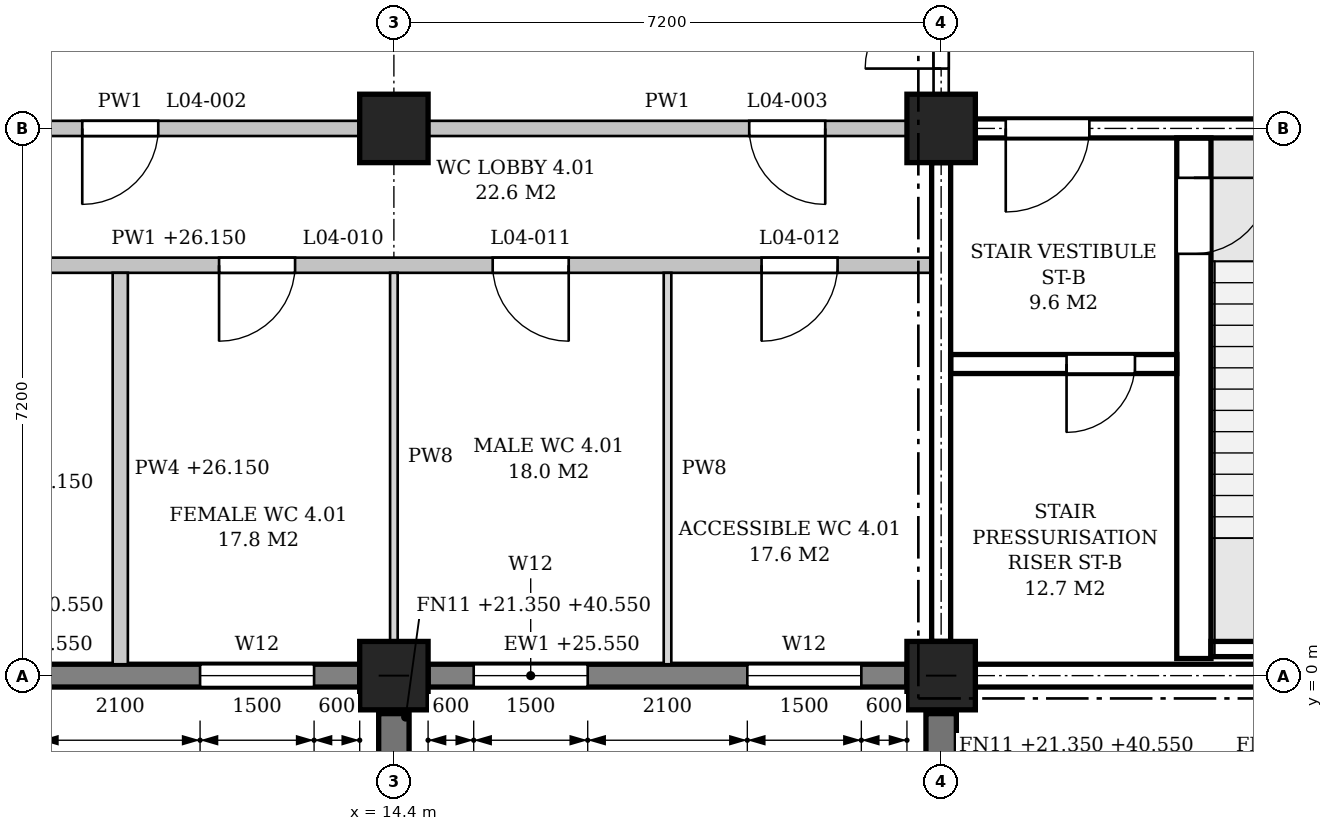
"""IFC4 building model, lengths in metres.
Left out: names, types, materials, properties, quantities, classifications, styles, units other than length and angle.
Written with IfcOpenShell. Run it as: python <this file> out.ifc"""

import sys

from ifc_helpers import new_model, si_unit, direction, frame, frame_2d, origin, origin_2d, place, context, subcontext, project, spatial, polyline, rectangle, outline, extrude, element, fill, save


model = new_model("IFC4")
c1 = context("Model", 3, precision=1e-05, world=origin(), true_north=direction((0.0, 1.0)))
c2 = subcontext(c1, "Body", "Model", "MODEL_VIEW")
j1 = project(units=[si_unit("LENGTHUNIT", "METRE"), si_unit("PLANEANGLEUNIT", "RADIAN")], contexts=[c1])
p1 = place(None, origin())
s1 = spatial("IfcSite", under=j1, at=p1, CompositionType="ELEMENT")
p2 = place(p1, origin())
s2 = spatial("IfcBuilding", under=s1, at=p2, CompositionType="ELEMENT")
p3 = place(p2, frame((0.0, 0.0, 21.6)))
s3 = spatial("IfcBuildingStorey", under=s2, at=p3, CompositionType="ELEMENT", Elevation=21.6)
for number, where, z_axis, x_axis in (
    (1, (14.4, 0.0, 0.0), (0.0, 0.0, 1.0), (1.0, 0.0, 0.0)),
    (2, (14.4, 7.2, 0.0), (0.0, 0.0, 1.0), (1.0, 0.0, 0.0)),
    (3, (21.6, 0.0, 0.0), (0.0, 0.0, 1.0), (1.0, 0.0, 0.0)),
    (4, (21.6, 7.2, 0.0), (0.0, 0.0, 1.0), (1.0, 0.0, 0.0)),
):
    element("IfcColumn", number, at=place(p3, frame(where, z_axis=z_axis, x_axis=x_axis)), inside=s3, PredefinedType="COLUMN", context=c2, shape_type="SweptSolid", body=[
        extrude(rectangle(XDim=0.9, YDim=0.9, at=origin_2d()), origin(), (0.0, 0.0, 1.0), 4.8),
    ])
p4 = place(p3, frame((7.65, 0.0, 0.0), z_axis=(0.0, 0.0, 1.0), x_axis=(1.0, 0.0, 0.0)))
e5 = element("IfcWall", 5, at=p4, inside=s3, PredefinedType="STANDARD", context=c2, shape_type="SweptSolid", body=[
    extrude(rectangle(XDim=6.3, YDim=0.3, at=frame_2d((3.15, 0.0))), origin(), (0.0, 0.0, 1.0), 3.95),
])
p5 = place(p4, frame((0.6, 0.0, 0.9)))
e6 = element("IfcOpeningElement", 6, at=p5, cuts=e5, PredefinedType="OPENING", context=c2, shape_type="SweptSolid", body=[
    extrude(outline(polyline([(0.0, 0.0), (1.5, 0.0), (1.5, 1.75), (0.75, 2.5), (0.0, 1.75), (0.0, 0.0)])), frame((0.0, 0.16, 0.0), z_axis=(0.0, -1.0, 0.0), x_axis=(1.0, 0.0, 0.0)), (0.0, 0.0, 1.0), 0.32),
])
p6 = place(p4, frame((4.2, 0.0, 0.9)))
e7 = element("IfcOpeningElement", 7, at=p6, cuts=e5, PredefinedType="OPENING", context=c2, shape_type="SweptSolid", body=[
    extrude(outline(polyline([(0.0, 0.0), (1.5, 0.0), (1.5, 1.75), (0.75, 2.5), (0.0, 1.75), (0.0, 0.0)])), frame((0.0, 0.16, 0.0), z_axis=(0.0, -1.0, 0.0), x_axis=(1.0, 0.0, 0.0)), (0.0, 0.0, 1.0), 0.32),
])
p7 = place(p3, frame((14.85, 0.0, 0.0), z_axis=(0.0, 0.0, 1.0), x_axis=(1.0, 0.0, 0.0)))
e8 = element("IfcWall", 8, at=p7, inside=s3, PredefinedType="STANDARD", context=c2, shape_type="SweptSolid", body=[
    extrude(rectangle(XDim=6.3, YDim=0.3, at=frame_2d((3.15, 0.0))), origin(), (0.0, 0.0, 1.0), 3.95),
])
p8 = place(p7, frame((0.6, 0.0, 0.9)))
e9 = element("IfcOpeningElement", 9, at=p8, cuts=e8, PredefinedType="OPENING", context=c2, shape_type="SweptSolid", body=[
    extrude(outline(polyline([(0.0, 0.0), (1.5, 0.0), (1.5, 1.75), (0.75, 2.5), (0.0, 1.75), (0.0, 0.0)])), frame((0.0, 0.16, 0.0), z_axis=(0.0, -1.0, 0.0), x_axis=(1.0, 0.0, 0.0)), (0.0, 0.0, 1.0), 0.32),
])
p9 = place(p7, frame((4.2, 0.0, 0.9)))
e10 = element("IfcOpeningElement", 10, at=p9, cuts=e8, PredefinedType="OPENING", context=c2, shape_type="SweptSolid", body=[
    extrude(outline(polyline([(0.0, 0.0), (1.5, 0.0), (1.5, 1.75), (0.75, 2.5), (0.0, 1.75), (0.0, 0.0)])), frame((0.0, 0.16, 0.0), z_axis=(0.0, -1.0, 0.0), x_axis=(1.0, 0.0, 0.0)), (0.0, 0.0, 1.0), 0.32),
])
p10 = place(p3, frame((22.05, 0.0, 0.0), z_axis=(0.0, 0.0, 1.0), x_axis=(1.0, 0.0, 0.0)))
e11 = element("IfcWall", 11, at=p10, inside=s3, PredefinedType="STANDARD", context=c2, shape_type="SweptSolid", body=[
    extrude(rectangle(XDim=6.3, YDim=0.3, at=frame_2d((3.15, 0.0))), origin(), (0.0, 0.0, 1.0), 3.95),
])
p11 = place(p10, frame((4.5, 0.0, 0.9)))
e12 = element("IfcOpeningElement", 12, at=p11, cuts=e11, PredefinedType="OPENING", context=c2, shape_type="SweptSolid", body=[
    extrude(outline(polyline([(0.0, 0.0), (0.9, 0.0), (0.9, 2.05), (0.45, 2.5), (0.0, 2.05), (0.0, 0.0)])), frame((0.0, 0.16, 0.0), z_axis=(0.0, -1.0, 0.0), x_axis=(1.0, 0.0, 0.0)), (0.0, 0.0, 1.0), 0.32),
])
for number, where, z_axis, x_axis in (
    (13, (14.4, -0.5, -0.25), (0.0, 0.0, 1.0), (0.0, -1.0, 0.0)),
    (14, (21.6, -0.5, -0.25), (0.0, 0.0, 1.0), (0.0, -1.0, 0.0)),
):
    element("IfcWall", number, at=place(p3, frame(where, z_axis=z_axis, x_axis=x_axis)), inside=s3, PredefinedType="POLYGONAL", context=c2, shape_type="SweptSolid", body=[
        extrude(outline(polyline([(0.85, 0.0), (0.85, 18.9), (0.65, 19.2), (0.0, 19.2), (0.0, 0.0), (0.85, 0.0)])), frame((0.0, 0.2, 0.0), z_axis=(0.0, -1.0, 0.0), x_axis=(1.0, 0.0, 0.0)), (0.0, 0.0, 1.0), 0.4),
    ])
p12 = place(p3, frame((22.05, 7.2, 0.0), z_axis=(0.0, 0.0, 1.0), x_axis=(1.0, 0.0, 0.0)))
e15 = element("IfcWall", 15, at=p12, inside=s3, PredefinedType="SHEAR", context=c2, shape_type="SweptSolid", body=[
    extrude(rectangle(XDim=6.3, YDim=0.25, at=frame_2d((3.15, 0.0))), origin(), (0.0, 0.0, 1.0), 3.8),
])
p13 = place(p12, frame((0.4, 0.0, 0.0)))
e16 = element("IfcOpeningElement", 16, at=p13, cuts=e15, PredefinedType="OPENING", context=c2, shape_type="SweptSolid", body=[
    extrude(rectangle(XDim=1.1, YDim=2.1, at=frame_2d((0.55, 1.05))), frame((0.0, 0.135, 0.0), z_axis=(0.0, -1.0, 0.0), x_axis=(1.0, 0.0, 0.0)), (0.0, 0.0, 1.0), 0.27),
])
p14 = place(p3, frame((21.6, 0.45, 0.0), z_axis=(0.0, 0.0, 1.0), x_axis=(0.0, 1.0, 0.0)))
e17 = element("IfcWall", 17, at=p14, inside=s3, PredefinedType="SHEAR", context=c2, shape_type="SweptSolid", body=[
    extrude(rectangle(XDim=6.3, YDim=0.25, at=frame_2d((3.15, 0.0))), origin(), (0.0, 0.0, 1.0), 3.8),
])
p15 = place(p3, frame((25.15, 0.35, -0.25), z_axis=(0.0, 0.0, 1.0), x_axis=(1.0, 0.0, 0.0)))
e18 = element("IfcWall", 18, at=p15, inside=s3, PredefinedType="SHEAR", context=c2, shape_type="SweptSolid", body=[
    extrude(rectangle(XDim=1.4, YDim=0.2, at=frame_2d((0.7, 0.0))), origin(), (0.0, 0.0, 1.0), 4.8),
])
p16 = place(p3, frame((24.925, 0.225, 0.0), z_axis=(0.0, 0.0, 1.0), x_axis=(0.0, 1.0, 0.0)))
e19 = element("IfcWall", 19, at=p16, inside=s3, PredefinedType="SHEAR", context=c2, shape_type="SweptSolid", body=[
    extrude(rectangle(XDim=6.85, YDim=0.45, at=frame_2d((3.425, 0.0))), origin(), (0.0, 0.0, 1.0), 4.55),
])
p17 = place(p16, frame((5.325, 0.0, 0.0)))
e20 = element("IfcOpeningElement", 20, at=p17, cuts=e19, PredefinedType="OPENING", context=c2, shape_type="SweptSolid", body=[
    extrude(rectangle(XDim=1.0, YDim=2.1, at=frame_2d((0.5, 1.05))), frame((0.0, 0.235, 0.0), z_axis=(0.0, -1.0, 0.0), x_axis=(1.0, 0.0, 0.0)), (0.0, 0.0, 1.0), 0.47),
])
p18 = place(p3, frame((21.725, 4.1, 0.0), z_axis=(0.0, 0.0, 1.0), x_axis=(1.0, 0.0, 0.0)))
e21 = element("IfcWall", 21, at=p18, inside=s3, PredefinedType="SHEAR", context=c2, shape_type="SweptSolid", body=[
    extrude(rectangle(XDim=2.975, YDim=0.25, at=frame_2d((1.487, 0.0))), origin(), (0.0, 0.0, 1.0), 4.55),
])
p19 = place(p18, frame((1.525, 0.0, 0.0)))
e22 = element("IfcOpeningElement", 22, at=p19, cuts=e21, PredefinedType="OPENING", context=c2, shape_type="SweptSolid", body=[
    extrude(rectangle(XDim=0.9, YDim=2.1, at=frame_2d((0.45, 1.05))), frame((0.0, 0.135, 0.0), z_axis=(0.0, -1.0, 0.0), x_axis=(1.0, 0.0, 0.0)), (0.0, 0.0, 1.0), 0.27),
])
p20 = place(p3, frame((7.325, 5.4, 0.0), z_axis=(0.0, 0.0, 1.0), x_axis=(1.0, 0.0, 0.0)))
e23 = element("IfcWall", 23, at=p20, inside=s3, PredefinedType="PARTITIONING", context=c2, shape_type="SweptSolid", body=[
    extrude(outline(polyline([(0.0, 0.0), (14.15, 0.0), (14.15, 3.8), (14.025, 3.8), (14.025, 4.55), (7.325, 4.55), (7.325, 3.8), (6.825, 3.8), (6.825, 4.55), (0.125, 4.55), (0.125, 3.8), (0.0, 3.8), (0.0, 0.0)])), frame((0.0, 0.1, 0.0), z_axis=(0.0, -1.0, 0.0), x_axis=(1.0, 0.0, 0.0)), (0.0, 0.0, 1.0), 0.2),
])
p21 = place(p20, frame((1.238, 0.0, 0.0)))
e24 = element("IfcOpeningElement", 24, at=p21, cuts=e23, PredefinedType="OPENING", context=c2, shape_type="SweptSolid", body=[
    extrude(rectangle(XDim=1.0, YDim=2.1, at=frame_2d((0.5, 1.05))), frame((0.0, 0.11, 0.0), z_axis=(0.0, -1.0, 0.0), x_axis=(1.0, 0.0, 0.0)), (0.0, 0.0, 1.0), 0.22),
])
p22 = place(p20, frame((4.775, 0.0, 0.0)))
e25 = element("IfcOpeningElement", 25, at=p22, cuts=e23, PredefinedType="OPENING", context=c2, shape_type="SweptSolid", body=[
    extrude(rectangle(XDim=1.0, YDim=2.1, at=frame_2d((0.5, 1.05))), frame((0.0, 0.11, 0.0), z_axis=(0.0, -1.0, 0.0), x_axis=(1.0, 0.0, 0.0)), (0.0, 0.0, 1.0), 0.22),
])
p23 = place(p20, frame((8.375, 0.0, 0.0)))
e26 = element("IfcOpeningElement", 26, at=p23, cuts=e23, PredefinedType="OPENING", context=c2, shape_type="SweptSolid", body=[
    extrude(rectangle(XDim=1.0, YDim=2.1, at=frame_2d((0.5, 1.05))), frame((0.0, 0.11, 0.0), z_axis=(0.0, -1.0, 0.0), x_axis=(1.0, 0.0, 0.0)), (0.0, 0.0, 1.0), 0.22),
])
p24 = place(p20, frame((11.913, 0.0, 0.0)))
e27 = element("IfcOpeningElement", 27, at=p24, cuts=e23, PredefinedType="OPENING", context=c2, shape_type="SweptSolid", body=[
    extrude(rectangle(XDim=1.0, YDim=2.1, at=frame_2d((0.5, 1.05))), frame((0.0, 0.11, 0.0), z_axis=(0.0, -1.0, 0.0), x_axis=(1.0, 0.0, 0.0)), (0.0, 0.0, 1.0), 0.22),
])
p25 = place(p3, frame((7.65, 7.2, 0.0), z_axis=(0.0, 0.0, 1.0), x_axis=(1.0, 0.0, 0.0)))
e28 = element("IfcWall", 28, at=p25, inside=s3, PredefinedType="PARTITIONING", context=c2, shape_type="SweptSolid", body=[
    extrude(rectangle(XDim=6.3, YDim=0.2, at=frame_2d((3.15, 0.0))), origin(), (0.0, 0.0, 1.0), 3.8),
])
p26 = place(p25, frame((2.65, 0.0, 0.0)))
e29 = element("IfcOpeningElement", 29, at=p26, cuts=e28, PredefinedType="OPENING", context=c2, shape_type="SweptSolid", body=[
    extrude(rectangle(XDim=1.0, YDim=2.1, at=frame_2d((0.5, 1.05))), frame((0.0, 0.11, 0.0), z_axis=(0.0, -1.0, 0.0), x_axis=(1.0, 0.0, 0.0)), (0.0, 0.0, 1.0), 0.22),
])
p27 = place(p3, frame((14.85, 7.2, 0.0), z_axis=(0.0, 0.0, 1.0), x_axis=(1.0, 0.0, 0.0)))
e30 = element("IfcWall", 30, at=p27, inside=s3, PredefinedType="PARTITIONING", context=c2, shape_type="SweptSolid", body=[
    extrude(rectangle(XDim=6.3, YDim=0.2, at=frame_2d((3.15, 0.0))), origin(), (0.0, 0.0, 1.0), 3.8),
])
p28 = place(p27, frame((4.225, 0.0, 0.0)))
e31 = element("IfcOpeningElement", 31, at=p28, cuts=e30, PredefinedType="OPENING", context=c2, shape_type="SweptSolid", body=[
    extrude(rectangle(XDim=1.0, YDim=2.1, at=frame_2d((0.5, 1.05))), frame((0.0, 0.11, 0.0), z_axis=(0.0, -1.0, 0.0), x_axis=(1.0, 0.0, 0.0)), (0.0, 0.0, 1.0), 0.22),
])
p29 = place(p3, frame((10.8, 0.15, 0.0), z_axis=(0.0, 0.0, 1.0), x_axis=(0.0, 1.0, 0.0)))
e32 = element("IfcWall", 32, at=p29, inside=s3, PredefinedType="PARTITIONING", context=c2, shape_type="SweptSolid", body=[
    extrude(outline(polyline([(0.0, 0.0), (5.15, 0.0), (5.15, 4.55), (0.1, 4.55), (0.1, 3.95), (0.0, 3.95), (0.0, 0.0)])), frame((0.0, 0.1, 0.0), z_axis=(0.0, -1.0, 0.0), x_axis=(1.0, 0.0, 0.0)), (0.0, 0.0, 1.0), 0.2),
])
p30 = place(p3, frame((14.4, 0.45, 0.0), z_axis=(0.0, 0.0, 1.0), x_axis=(0.0, 1.0, 0.0)))
e33 = element("IfcWall", 33, at=p30, inside=s3, PredefinedType="PARTITIONING", context=c2, shape_type="SweptSolid", body=[
    extrude(rectangle(XDim=4.85, YDim=0.1, at=frame_2d((2.425, 0.0))), origin(), (0.0, 0.0, 1.0), 3.8),
])
p31 = place(p3, frame((18.0, 0.15, 0.0), z_axis=(0.0, 0.0, 1.0), x_axis=(0.0, 1.0, 0.0)))
e34 = element("IfcWall", 34, at=p31, inside=s3, PredefinedType="PARTITIONING", context=c2, shape_type="SweptSolid", body=[
    extrude(rectangle(XDim=5.15, YDim=0.1, at=frame_2d((2.575, 0.0))), origin(), (0.0, 0.0, 1.0), 3.8),
])
p32 = place(p3, frame((21.6, 7.65, 0.0), z_axis=(0.0, 0.0, 1.0), x_axis=(0.0, 1.0, 0.0)))
e35 = element("IfcWall", 35, at=p32, inside=s3, PredefinedType="PARTITIONING", context=c2, shape_type="SweptSolid", body=[
    extrude(rectangle(XDim=2.675, YDim=0.2, at=frame_2d((1.337, 0.0))), origin(), (0.0, 0.0, 1.0), 3.8),
])
p33 = place(p32, frame((0.337, 0.0, 0.0)))
e36 = element("IfcOpeningElement", 36, at=p33, cuts=e35, PredefinedType="OPENING", context=c2, shape_type="SweptSolid", body=[
    extrude(rectangle(XDim=2.0, YDim=2.4, at=frame_2d((1.0, 1.2))), frame((0.0, 0.11, 0.0), z_axis=(0.0, -1.0, 0.0), x_axis=(1.0, 0.0, 0.0)), (0.0, 0.0, 1.0), 0.22),
])
p34 = place(p6, origin())
e37 = element("IfcWindow", 37, at=p34, inside=s3, PartitioningType="SINGLE_PANEL", PredefinedType="WINDOW", context=c2, shape_type="SweptSolid", body=[
    extrude(outline(polyline([(0.0, 0.0), (1.5, 0.0), (1.5, 1.75), (0.75, 2.5), (0.0, 1.75), (0.0, 0.0)])), frame((0.0, 0.03, 0.0), z_axis=(0.0, -1.0, 0.0), x_axis=(1.0, 0.0, 0.0)), (0.0, 0.0, 1.0), 0.06),
])
fill(e7, e37)
p35 = place(p8, origin())
e38 = element("IfcWindow", 38, at=p35, inside=s3, PartitioningType="SINGLE_PANEL", PredefinedType="WINDOW", context=c2, shape_type="SweptSolid", body=[
    extrude(outline(polyline([(0.0, 0.0), (1.5, 0.0), (1.5, 1.75), (0.75, 2.5), (0.0, 1.75), (0.0, 0.0)])), frame((0.0, 0.03, 0.0), z_axis=(0.0, -1.0, 0.0), x_axis=(1.0, 0.0, 0.0)), (0.0, 0.0, 1.0), 0.06),
])
fill(e9, e38)
p36 = place(p9, origin())
e39 = element("IfcWindow", 39, at=p36, inside=s3, PartitioningType="SINGLE_PANEL", PredefinedType="WINDOW", context=c2, shape_type="SweptSolid", body=[
    extrude(outline(polyline([(0.0, 0.0), (1.5, 0.0), (1.5, 1.75), (0.75, 2.5), (0.0, 1.75), (0.0, 0.0)])), frame((0.0, 0.03, 0.0), z_axis=(0.0, -1.0, 0.0), x_axis=(1.0, 0.0, 0.0)), (0.0, 0.0, 1.0), 0.06),
])
fill(e10, e39)
p37 = place(p17, frame((1.0, 0.0, 0.0), z_axis=(0.0, 0.0, 1.0), x_axis=(-1.0, 0.0, 0.0)))
e40 = element("IfcDoor", 40, at=p37, inside=s3, OperationType="SINGLE_SWING_LEFT", PredefinedType="DOOR", context=c2, shape_type="SweptSolid", body=[
    extrude(rectangle(XDim=1.0, YDim=2.1, at=frame_2d((0.5, 1.05))), frame((0.0, 0.025, 0.0), z_axis=(0.0, -1.0, 0.0), x_axis=(1.0, 0.0, 0.0)), (0.0, 0.0, 1.0), 0.05),
])
fill(e20, e40)
p38 = place(p13, frame((1.1, 0.0, 0.0), z_axis=(0.0, 0.0, 1.0), x_axis=(-1.0, 0.0, 0.0)))
e41 = element("IfcDoor", 41, at=p38, inside=s3, OperationType="SINGLE_SWING_RIGHT", PredefinedType="DOOR", context=c2, shape_type="SweptSolid", body=[
    extrude(rectangle(XDim=1.1, YDim=2.1, at=frame_2d((0.55, 1.05))), frame((0.0, 0.025, 0.0), z_axis=(0.0, -1.0, 0.0), x_axis=(1.0, 0.0, 0.0)), (0.0, 0.0, 1.0), 0.05),
])
fill(e16, e41)
p39 = place(p19, frame((0.9, 0.0, 0.0), z_axis=(0.0, 0.0, 1.0), x_axis=(-1.0, 0.0, 0.0)))
e42 = element("IfcDoor", 42, at=p39, inside=s3, OperationType="SINGLE_SWING_RIGHT", PredefinedType="DOOR", context=c2, shape_type="SweptSolid", body=[
    extrude(rectangle(XDim=0.9, YDim=2.1, at=frame_2d((0.45, 1.05))), frame((0.0, 0.025, 0.0), z_axis=(0.0, -1.0, 0.0), x_axis=(1.0, 0.0, 0.0)), (0.0, 0.0, 1.0), 0.05),
])
fill(e22, e42)
p40 = place(p33, origin())
e43 = element("IfcDoor", 43, at=p40, inside=s3, OperationType="DOUBLE_DOOR_SINGLE_SWING", PredefinedType="DOOR", context=c2, shape_type="SweptSolid", body=[
    extrude(rectangle(XDim=2.0, YDim=2.4, at=frame_2d((1.0, 1.2))), frame((0.0, 0.025, 0.0), z_axis=(0.0, -1.0, 0.0), x_axis=(1.0, 0.0, 0.0)), (0.0, 0.0, 1.0), 0.05),
])
fill(e36, e43)
p41 = place(p26, frame((1.0, 0.0, 0.0), z_axis=(0.0, 0.0, 1.0), x_axis=(-1.0, 0.0, 0.0)))
e44 = element("IfcDoor", 44, at=p41, inside=s3, OperationType="SINGLE_SWING_RIGHT", PredefinedType="DOOR", context=c2, shape_type="SweptSolid", body=[
    extrude(rectangle(XDim=1.0, YDim=2.1, at=frame_2d((0.5, 1.05))), frame((0.0, 0.025, 0.0), z_axis=(0.0, -1.0, 0.0), x_axis=(1.0, 0.0, 0.0)), (0.0, 0.0, 1.0), 0.05),
])
fill(e29, e44)
p42 = place(p28, frame((1.0, 0.0, 0.0), z_axis=(0.0, 0.0, 1.0), x_axis=(-1.0, 0.0, 0.0)))
e45 = element("IfcDoor", 45, at=p42, inside=s3, OperationType="SINGLE_SWING_LEFT", PredefinedType="DOOR", context=c2, shape_type="SweptSolid", body=[
    extrude(rectangle(XDim=1.0, YDim=2.1, at=frame_2d((0.5, 1.05))), frame((0.0, 0.025, 0.0), z_axis=(0.0, -1.0, 0.0), x_axis=(1.0, 0.0, 0.0)), (0.0, 0.0, 1.0), 0.05),
])
fill(e31, e45)
p43 = place(p22, frame((1.0, 0.0, 0.0), z_axis=(0.0, 0.0, 1.0), x_axis=(-1.0, 0.0, 0.0)))
e46 = element("IfcDoor", 46, at=p43, inside=s3, OperationType="SINGLE_SWING_RIGHT", PredefinedType="DOOR", context=c2, shape_type="SweptSolid", body=[
    extrude(rectangle(XDim=1.0, YDim=2.1, at=frame_2d((0.5, 1.05))), frame((0.0, 0.025, 0.0), z_axis=(0.0, -1.0, 0.0), x_axis=(1.0, 0.0, 0.0)), (0.0, 0.0, 1.0), 0.05),
])
fill(e25, e46)
p44 = place(p23, frame((1.0, 0.0, 0.0), z_axis=(0.0, 0.0, 1.0), x_axis=(-1.0, 0.0, 0.0)))
e47 = element("IfcDoor", 47, at=p44, inside=s3, OperationType="SINGLE_SWING_LEFT", PredefinedType="DOOR", context=c2, shape_type="SweptSolid", body=[
    extrude(rectangle(XDim=1.0, YDim=2.1, at=frame_2d((0.5, 1.05))), frame((0.0, 0.025, 0.0), z_axis=(0.0, -1.0, 0.0), x_axis=(1.0, 0.0, 0.0)), (0.0, 0.0, 1.0), 0.05),
])
fill(e26, e47)
p45 = place(p24, frame((1.0, 0.0, 0.0), z_axis=(0.0, 0.0, 1.0), x_axis=(-1.0, 0.0, 0.0)))
e48 = element("IfcDoor", 48, at=p45, inside=s3, OperationType="SINGLE_SWING_RIGHT", PredefinedType="DOOR", context=c2, shape_type="SweptSolid", body=[
    extrude(rectangle(XDim=1.0, YDim=2.1, at=frame_2d((0.5, 1.05))), frame((0.0, 0.025, 0.0), z_axis=(0.0, -1.0, 0.0), x_axis=(1.0, 0.0, 0.0)), (0.0, 0.0, 1.0), 0.05),
])
fill(e27, e48)
save(model, sys.argv[1])
